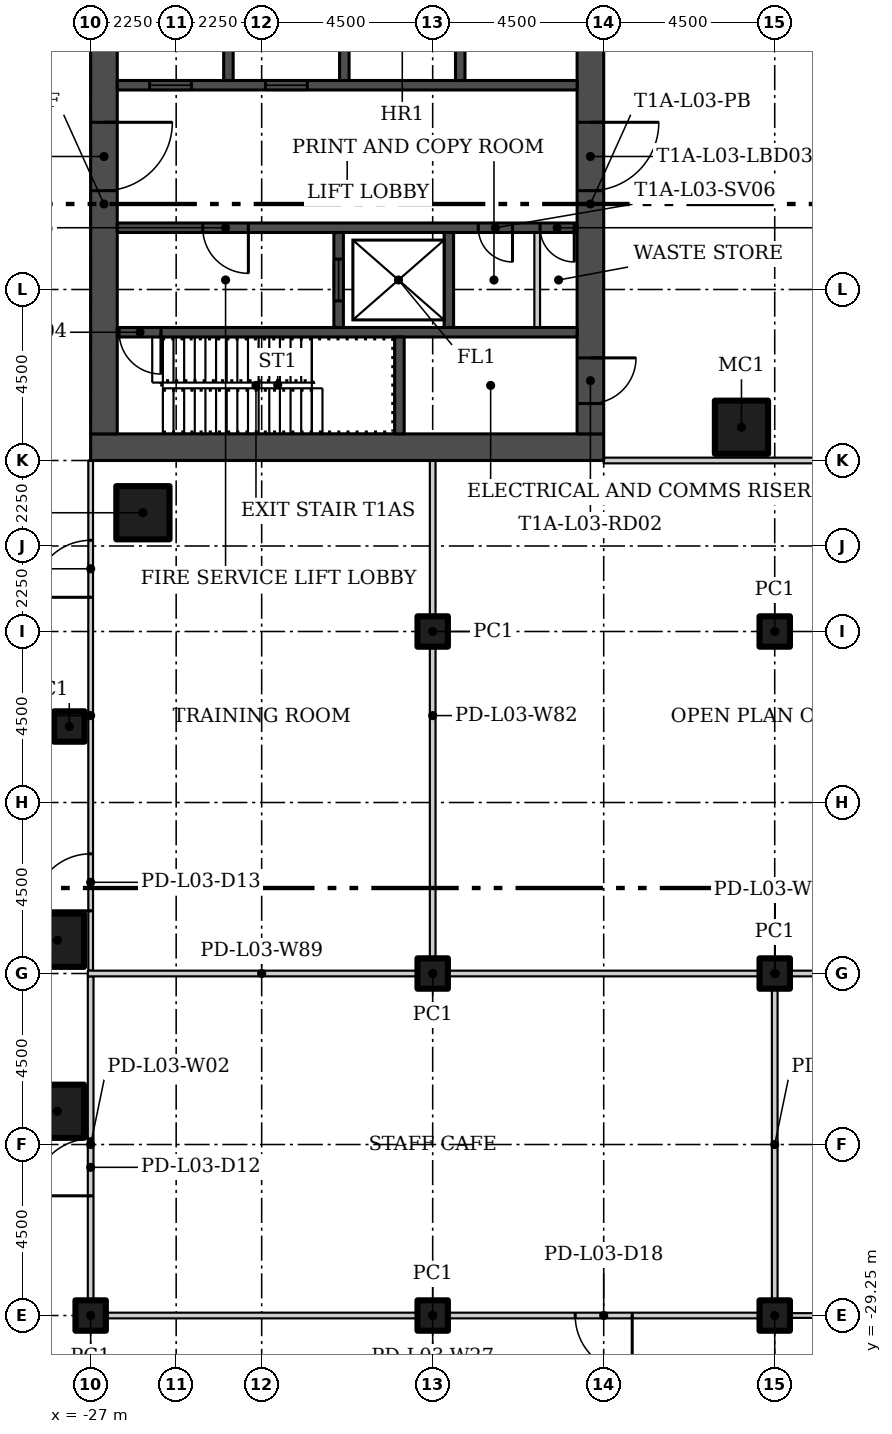
"""IFC4 building model, lengths in metres.
Left out: names, types, materials, properties, quantities, classifications, styles, units other than length and angle.
Written with IfcOpenShell. Run it as: python <this file> out.ifc"""

import sys

from ifc_helpers import new_model, si_unit, direction, frame, frame_2d, origin, origin_2d, place, context, subcontext, project, spatial, rectangle, hollow_rectangle, extrude, element, fill, save


model = new_model("IFC4")
c1 = context("Model", 3, precision=1e-05, world=origin(), true_north=direction((0.0, 1.0)))
c2 = subcontext(c1, "Body", "Model", "MODEL_VIEW")
j1 = project(units=[si_unit("LENGTHUNIT", "METRE"), si_unit("PLANEANGLEUNIT", "RADIAN")], contexts=[c1])
p1 = place(None, origin())
s1 = spatial("IfcSite", under=j1, at=p1, CompositionType="ELEMENT")
p2 = place(p1, origin())
s2 = spatial("IfcBuilding", under=s1, at=p2, CompositionType="ELEMENT")
p3 = place(p2, frame((0.0, 0.0, 18.5)))
s3 = spatial("IfcBuildingStorey", under=s2, at=p3, CompositionType="ELEMENT", Elevation=18.5)
for number, where in (
    (1, (-25.625, -8.125, 0.0)),
    (2, (-9.875, -5.875, 0.0)),
):
    element("IfcColumn", number, at=place(p3, frame(where)), inside=s3, PredefinedType="COLUMN", context=c2, shape_type="SweptSolid", body=[
        extrude(hollow_rectangle(XDim=1.4, YDim=1.4, WallThickness=0.06, at=origin_2d()), origin(), (0.0, 0.0, 1.0), 4.6),
    ])
p4 = place(p3, frame((-27.562, -13.75, 0.0)))
e3 = element("IfcColumn", 3, at=p4, inside=s3, PredefinedType="COLUMN", context=c2, shape_type="SweptSolid", body=[
    extrude(hollow_rectangle(XDim=0.8, YDim=0.8, WallThickness=0.03, at=origin_2d()), origin(), (0.0, 0.0, 1.0), 4.6),
])
for number, where in (
    (4, (-27.875, -19.375, 0.0)),
    (5, (-27.875, -23.875, 0.0)),
):
    element("IfcColumn", number, at=place(p3, frame(where)), inside=s3, PredefinedType="COLUMN", context=c2, shape_type="SweptSolid", body=[
        extrude(hollow_rectangle(XDim=1.4, YDim=1.4, WallThickness=0.06, at=origin_2d()), origin(), (0.0, 0.0, 1.0), 4.6),
    ])
for number, where in (
    (6, (-27.0, -29.25, 0.0)),
    (7, (-18.0, -29.25, 0.0)),
    (8, (-18.0, -20.25, 0.0)),
    (9, (-18.0, -11.25, 0.0)),
    (10, (-9.0, -29.25, 0.0)),
    (11, (-9.0, -20.25, 0.0)),
    (12, (-9.0, -11.25, 0.0)),
):
    element("IfcColumn", number, at=place(p3, frame(where)), inside=s3, PredefinedType="COLUMN", context=c2, shape_type="SweptSolid", body=[
        extrude(hollow_rectangle(XDim=0.8, YDim=0.8, WallThickness=0.03, at=origin_2d()), origin(), (0.0, 0.0, 1.0), 4.6),
    ])
p5 = place(p3, frame((-27.0, -29.175, 0.0), z_axis=(0.0, 0.0, 1.0), x_axis=(0.0, 1.0, 0.0)))
e13 = element("IfcWall", 13, at=p5, inside=s3, PredefinedType="PARTITIONING", context=c2, shape_type="SweptSolid", body=[
    extrude(rectangle(XDim=8.85, YDim=0.15, at=frame_2d((4.425, 0.0))), origin(), (0.0, 0.0, 1.0), 4.6),
])
p6 = place(p5, frame((3.075, 0.0, 0.0)))
e14 = element("IfcOpeningElement", 14, at=p6, cuts=e13, PredefinedType="OPENING", context=c2, shape_type="SweptSolid", body=[
    extrude(rectangle(XDim=1.5, YDim=2.1, at=frame_2d((0.75, 1.05))), frame((0.0, 0.085, 0.0), z_axis=(0.0, -1.0, 0.0), x_axis=(1.0, 0.0, 0.0)), (0.0, 0.0, 1.0), 0.17),
])
p7 = place(p3, frame((-27.0, -20.175, 0.0), z_axis=(0.0, 0.0, 1.0), x_axis=(0.0, 1.0, 0.0)))
e15 = element("IfcWall", 15, at=p7, inside=s3, PredefinedType="PARTITIONING", context=c2, shape_type="SweptSolid", body=[
    extrude(rectangle(XDim=13.425, YDim=0.125, at=frame_2d((6.712, 0.0))), origin(), (0.0, 0.0, 1.0), 4.6),
])
p8 = place(p7, frame((1.575, 0.0, 0.0)))
e16 = element("IfcOpeningElement", 16, at=p8, cuts=e15, PredefinedType="OPENING", context=c2, shape_type="SweptSolid", body=[
    extrude(rectangle(XDim=1.5, YDim=2.1, at=frame_2d((0.75, 1.05))), frame((0.0, 0.073, 0.0), z_axis=(0.0, -1.0, 0.0), x_axis=(1.0, 0.0, 0.0)), (0.0, 0.0, 1.0), 0.145),
])
p9 = place(p7, frame((9.825, 0.0, 0.0)))
e17 = element("IfcOpeningElement", 17, at=p9, cuts=e15, PredefinedType="OPENING", context=c2, shape_type="SweptSolid", body=[
    extrude(rectangle(XDim=1.5, YDim=2.1, at=frame_2d((0.75, 1.05))), frame((0.0, 0.073, 0.0), z_axis=(0.0, -1.0, 0.0), x_axis=(1.0, 0.0, 0.0)), (0.0, 0.0, 1.0), 0.145),
])
p10 = place(p3, frame((13.5, -6.75, 0.0), z_axis=(0.0, 0.0, 1.0), x_axis=(-1.0, 0.0, 0.0)))
e18 = element("IfcWall", 18, at=p10, inside=s3, PredefinedType="PARTITIONING", context=c2, shape_type="SweptSolid", body=[
    extrude(rectangle(XDim=27.0, YDim=0.15, at=frame_2d((13.5, 0.0))), origin(), (0.0, 0.0, 1.0), 4.6),
])
p11 = place(p10, frame((8.25, 0.0, 0.0)))
e19 = element("IfcOpeningElement", 19, at=p11, cuts=e18, PredefinedType="OPENING", context=c2, shape_type="SweptSolid", body=[
    extrude(rectangle(XDim=1.5, YDim=2.1, at=frame_2d((0.75, 1.05))), frame((0.0, 0.085, 0.0), z_axis=(0.0, -1.0, 0.0), x_axis=(1.0, 0.0, 0.0)), (0.0, 0.0, 1.0), 0.17),
])
p12 = place(p10, frame((16.65, 0.0, 0.0)))
e20 = element("IfcOpeningElement", 20, at=p12, cuts=e18, PredefinedType="OPENING", context=c2, shape_type="SweptSolid", body=[
    extrude(rectangle(XDim=1.5, YDim=2.1, at=frame_2d((0.75, 1.05))), frame((0.0, 0.085, 0.0), z_axis=(0.0, -1.0, 0.0), x_axis=(1.0, 0.0, 0.0)), (0.0, 0.0, 1.0), 0.17),
])
p13 = place(p3, frame((-8.925, -29.25, 0.0), z_axis=(0.0, 0.0, 1.0), x_axis=(-1.0, 0.0, 0.0)))
e21 = element("IfcWall", 21, at=p13, inside=s3, PredefinedType="PARTITIONING", context=c2, shape_type="SweptSolid", body=[
    extrude(rectangle(XDim=18.15, YDim=0.15, at=frame_2d((9.075, 0.0))), origin(), (0.0, 0.0, 1.0), 4.6),
])
p14 = place(p13, frame((3.825, 0.0, 0.0)))
e22 = element("IfcOpeningElement", 22, at=p14, cuts=e21, PredefinedType="OPENING", context=c2, shape_type="SweptSolid", body=[
    extrude(rectangle(XDim=1.5, YDim=2.1, at=frame_2d((0.75, 1.05))), frame((0.0, 0.085, 0.0), z_axis=(0.0, -1.0, 0.0), x_axis=(1.0, 0.0, 0.0)), (0.0, 0.0, 1.0), 0.17),
])
p15 = place(p3, frame((0.1, -29.25, 0.0), z_axis=(0.0, 0.0, 1.0), x_axis=(-1.0, 0.0, 0.0)))
e23 = element("IfcWall", 23, at=p15, inside=s3, PredefinedType="PARTITIONING", context=c2, shape_type="SweptSolid", body=[
    extrude(rectangle(XDim=9.175, YDim=0.125, at=frame_2d((4.587, 0.0))), origin(), (0.0, 0.0, 1.0), 4.6),
])
p16 = place(p15, frame((1.15, 0.0, 0.0)))
e24 = element("IfcOpeningElement", 24, at=p16, cuts=e23, PredefinedType="OPENING", context=c2, shape_type="SweptSolid", body=[
    extrude(rectangle(XDim=1.5, YDim=2.1, at=frame_2d((0.75, 1.05))), frame((0.0, 0.073, 0.0), z_axis=(0.0, -1.0, 0.0), x_axis=(1.0, 0.0, 0.0)), (0.0, 0.0, 1.0), 0.145),
])
p17 = place(p15, frame((6.55, 0.0, 0.0)))
e25 = element("IfcOpeningElement", 25, at=p17, cuts=e23, PredefinedType="OPENING", context=c2, shape_type="SweptSolid", body=[
    extrude(rectangle(XDim=1.5, YDim=2.1, at=frame_2d((0.75, 1.05))), frame((0.0, 0.073, 0.0), z_axis=(0.0, -1.0, 0.0), x_axis=(1.0, 0.0, 0.0)), (0.0, 0.0, 1.0), 0.145),
])
p18 = place(p3, frame((-18.075, -20.25, 0.0)))
e26 = element("IfcWall", 26, at=p18, inside=s3, PredefinedType="PARTITIONING", context=c2, shape_type="SweptSolid", body=[
    extrude(rectangle(XDim=18.175, YDim=0.15, at=frame_2d((9.087, 0.0))), origin(), (0.0, 0.0, 1.0), 4.6),
])
p19 = place(p3, frame((-18.0, -6.75, 0.0), z_axis=(0.0, 0.0, 1.0), x_axis=(0.0, -1.0, 0.0)))
e27 = element("IfcWall", 27, at=p19, inside=s3, PredefinedType="PARTITIONING", context=c2, shape_type="SweptSolid", body=[
    extrude(rectangle(XDim=13.425, YDim=0.15, at=frame_2d((6.712, 0.0))), origin(), (0.0, 0.0, 1.0), 4.6),
])
p20 = place(p3, frame((-17.925, -20.25, 0.0), z_axis=(0.0, 0.0, 1.0), x_axis=(-1.0, 0.0, 0.0)))
e28 = element("IfcWall", 28, at=p20, inside=s3, PredefinedType="PARTITIONING", context=c2, shape_type="SweptSolid", body=[
    extrude(rectangle(XDim=9.15, YDim=0.15, at=frame_2d((4.575, 0.0))), origin(), (0.0, 0.0, 1.0), 4.6),
])
p21 = place(p3, frame((-9.0, -29.175, 0.0), z_axis=(0.0, 0.0, 1.0), x_axis=(0.0, 1.0, 0.0)))
e29 = element("IfcWall", 29, at=p21, inside=s3, PredefinedType="PARTITIONING", context=c2, shape_type="SweptSolid", body=[
    extrude(rectangle(XDim=8.85, YDim=0.15, at=frame_2d((4.425, 0.0))), origin(), (0.0, 0.0, 1.0), 4.6),
])
p22 = place(p3, frame((-27.0, -6.4, 0.0)))
e30 = element("IfcWall", 30, at=p22, inside=s3, PredefinedType="SHEAR", context=c2, shape_type="SweptSolid", body=[
    extrude(rectangle(XDim=13.5, YDim=0.7, at=frame_2d((6.75, 0.0))), origin(), (0.0, 0.0, 1.0), 4.6),
])
p23 = place(p3, frame((-26.65, 6.05, 0.0), z_axis=(0.0, 0.0, 1.0), x_axis=(0.0, -1.0, 0.0)))
e31 = element("IfcWall", 31, at=p23, inside=s3, PredefinedType="SHEAR", context=c2, shape_type="SweptSolid", body=[
    extrude(rectangle(XDim=12.1, YDim=0.7, at=frame_2d((6.05, 0.0))), origin(), (0.0, 0.0, 1.0), 4.6),
])
p24 = place(p23, frame((3.9, 0.0, 0.0)))
e32 = element("IfcOpeningElement", 32, at=p24, cuts=e31, PredefinedType="OPENING", context=c2, shape_type="SweptSolid", body=[
    extrude(rectangle(XDim=1.8, YDim=2.4, at=frame_2d((0.9, 1.2))), frame((0.0, 0.36, 0.0), z_axis=(0.0, -1.0, 0.0), x_axis=(1.0, 0.0, 0.0)), (0.0, 0.0, 1.0), 0.72),
])
p25 = place(p3, frame((-13.85, 6.05, 0.0), z_axis=(0.0, 0.0, 1.0), x_axis=(0.0, -1.0, 0.0)))
e33 = element("IfcWall", 33, at=p25, inside=s3, PredefinedType="SHEAR", context=c2, shape_type="SweptSolid", body=[
    extrude(rectangle(XDim=12.1, YDim=0.7, at=frame_2d((6.05, 0.0))), origin(), (0.0, 0.0, 1.0), 4.6),
])
p26 = place(p25, frame((10.1, 0.0, 0.0)))
e34 = element("IfcOpeningElement", 34, at=p26, cuts=e33, PredefinedType="OPENING", context=c2, shape_type="SweptSolid", body=[
    extrude(rectangle(XDim=1.2, YDim=2.1, at=frame_2d((0.6, 1.05))), frame((0.0, 0.36, 0.0), z_axis=(0.0, -1.0, 0.0), x_axis=(1.0, 0.0, 0.0)), (0.0, 0.0, 1.0), 0.72),
])
p27 = place(p25, frame((3.9, 0.0, 0.0)))
e35 = element("IfcOpeningElement", 35, at=p27, cuts=e33, PredefinedType="OPENING", context=c2, shape_type="SweptSolid", body=[
    extrude(rectangle(XDim=1.8, YDim=2.4, at=frame_2d((0.9, 1.2))), frame((0.0, 0.36, 0.0), z_axis=(0.0, -1.0, 0.0), x_axis=(1.0, 0.0, 0.0)), (0.0, 0.0, 1.0), 0.72),
])
p28 = place(p3, frame((-14.2, -3.375, 0.0), z_axis=(0.0, 0.0, 1.0), x_axis=(-1.0, 0.0, 0.0)))
e36 = element("IfcWall", 36, at=p28, inside=s3, PredefinedType="SHEAR", context=c2, shape_type="SweptSolid", body=[
    extrude(rectangle(XDim=12.1, YDim=0.25, at=frame_2d((6.05, 0.0))), origin(), (0.0, 0.0, 1.0), 4.6),
])
p29 = place(p28, frame((10.95, 0.0, 0.0)))
e37 = element("IfcOpeningElement", 37, at=p29, cuts=e36, PredefinedType="OPENING", context=c2, shape_type="SweptSolid", body=[
    extrude(rectangle(XDim=1.1, YDim=2.1, at=frame_2d((0.55, 1.05))), frame((0.0, 0.135, 0.0), z_axis=(0.0, -1.0, 0.0), x_axis=(1.0, 0.0, 0.0)), (0.0, 0.0, 1.0), 0.27),
])
p30 = place(p3, frame((-18.875, -6.05, 0.0), z_axis=(0.0, 0.0, 1.0), x_axis=(0.0, 1.0, 0.0)))
e38 = element("IfcWall", 38, at=p30, inside=s3, PredefinedType="SHEAR", context=c2, shape_type="SweptSolid", body=[
    extrude(rectangle(XDim=2.55, YDim=0.25, at=frame_2d((1.275, 0.0))), origin(), (0.0, 0.0, 1.0), 4.6),
])
p31 = place(p3, frame((-14.2, -0.625, 0.0), z_axis=(0.0, 0.0, 1.0), x_axis=(-1.0, 0.0, 0.0)))
e39 = element("IfcWall", 39, at=p31, inside=s3, PredefinedType="SHEAR", context=c2, shape_type="SweptSolid", body=[
    extrude(rectangle(XDim=12.1, YDim=0.25, at=frame_2d((6.05, 0.0))), origin(), (0.0, 0.0, 1.0), 4.6),
])
p32 = place(p31, frame((8.65, 0.0, 0.0)))
e40 = element("IfcOpeningElement", 40, at=p32, cuts=e39, PredefinedType="OPENING", context=c2, shape_type="SweptSolid", body=[
    extrude(rectangle(XDim=1.2, YDim=2.1, at=frame_2d((0.6, 1.05))), frame((0.0, 0.135, 0.0), z_axis=(0.0, -1.0, 0.0), x_axis=(1.0, 0.0, 0.0)), (0.0, 0.0, 1.0), 0.27),
])
p33 = place(p31, frame((1.7, 0.0, 0.0)))
e41 = element("IfcOpeningElement", 41, at=p33, cuts=e39, PredefinedType="OPENING", context=c2, shape_type="SweptSolid", body=[
    extrude(rectangle(XDim=0.9, YDim=2.1, at=frame_2d((0.45, 1.05))), frame((0.0, 0.135, 0.0), z_axis=(0.0, -1.0, 0.0), x_axis=(1.0, 0.0, 0.0)), (0.0, 0.0, 1.0), 0.27),
])
p34 = place(p31, frame((0.075, 0.0, 0.0)))
e42 = element("IfcOpeningElement", 42, at=p34, cuts=e39, PredefinedType="OPENING", context=c2, shape_type="SweptSolid", body=[
    extrude(rectangle(XDim=0.9, YDim=2.1, at=frame_2d((0.45, 1.05))), frame((0.0, 0.135, 0.0), z_axis=(0.0, -1.0, 0.0), x_axis=(1.0, 0.0, 0.0)), (0.0, 0.0, 1.0), 0.27),
])
p35 = place(p3, frame((-20.475, -3.25, 0.0), z_axis=(0.0, 0.0, 1.0), x_axis=(0.0, 1.0, 0.0)))
e43 = element("IfcWall", 43, at=p35, inside=s3, PredefinedType="SHEAR", context=c2, shape_type="SweptSolid", body=[
    extrude(rectangle(XDim=2.5, YDim=0.25, at=frame_2d((1.25, 0.0))), origin(), (0.0, 0.0, 1.0), 4.6),
])
p36 = place(p35, frame((0.7, 0.0, 0.0)))
e44 = element("IfcOpeningElement", 44, at=p36, cuts=e43, PredefinedType="OPENING", context=c2, shape_type="SweptSolid", body=[
    extrude(rectangle(XDim=1.1, YDim=2.1, at=frame_2d((0.55, 1.05))), frame((0.0, 0.135, 0.0), z_axis=(0.0, -1.0, 0.0), x_axis=(1.0, 0.0, 0.0)), (0.0, 0.0, 1.0), 0.27),
])
p37 = place(p3, frame((-17.575, -3.25, 0.0), z_axis=(0.0, 0.0, 1.0), x_axis=(0.0, 1.0, 0.0)))
e45 = element("IfcWall", 45, at=p37, inside=s3, PredefinedType="SHEAR", context=c2, shape_type="SweptSolid", body=[
    extrude(rectangle(XDim=2.5, YDim=0.25, at=frame_2d((1.25, 0.0))), origin(), (0.0, 0.0, 1.0), 4.6),
])
p38 = place(p3, frame((-15.25, -3.25, 0.0), z_axis=(0.0, 0.0, 1.0), x_axis=(0.0, 1.0, 0.0)))
e46 = element("IfcWall", 46, at=p38, inside=s3, PredefinedType="PARTITIONING", context=c2, shape_type="SweptSolid", body=[
    extrude(rectangle(XDim=2.5, YDim=0.15, at=frame_2d((1.25, 0.0))), origin(), (0.0, 0.0, 1.0), 4.6),
])
p39 = place(p3, frame((-26.3, 3.125, 0.0)))
e47 = element("IfcWall", 47, at=p39, inside=s3, PredefinedType="SHEAR", context=c2, shape_type="SweptSolid", body=[
    extrude(rectangle(XDim=12.1, YDim=0.25, at=frame_2d((6.05, 0.0))), origin(), (0.0, 0.0, 1.0), 4.6),
])
p40 = place(p39, frame((0.85, 0.0, 0.0)))
e48 = element("IfcOpeningElement", 48, at=p40, cuts=e47, PredefinedType="OPENING", context=c2, shape_type="SweptSolid", body=[
    extrude(rectangle(XDim=1.1, YDim=2.1, at=frame_2d((0.55, 1.05))), frame((0.0, 0.135, 0.0), z_axis=(0.0, -1.0, 0.0), x_axis=(1.0, 0.0, 0.0)), (0.0, 0.0, 1.0), 0.27),
])
p41 = place(p39, frame((3.9, 0.0, 0.0)))
e49 = element("IfcOpeningElement", 49, at=p41, cuts=e47, PredefinedType="OPENING", context=c2, shape_type="SweptSolid", body=[
    extrude(rectangle(XDim=1.1, YDim=2.1, at=frame_2d((0.55, 1.05))), frame((0.0, 0.135, 0.0), z_axis=(0.0, -1.0, 0.0), x_axis=(1.0, 0.0, 0.0)), (0.0, 0.0, 1.0), 0.27),
])
for number, where, z_axis, x_axis in (
    (50, (-23.375, 3.25, 0.0), (0.0, 0.0, 1.0), (0.0, 1.0, 0.0)),
    (51, (-20.325, 3.25, 0.0), (0.0, 0.0, 1.0), (0.0, 1.0, 0.0)),
    (52, (-17.275, 3.25, 0.0), (0.0, 0.0, 1.0), (0.0, 1.0, 0.0)),
):
    element("IfcWall", number, at=place(p3, frame(where, z_axis=z_axis, x_axis=x_axis)), inside=s3, PredefinedType="SHEAR", context=c2, shape_type="SweptSolid", body=[
        extrude(rectangle(XDim=2.8, YDim=0.25, at=frame_2d((1.4, 0.0))), origin(), (0.0, 0.0, 1.0), 4.6),
    ])
p42 = place(p6, origin())
e53 = element("IfcDoor", 53, at=p42, inside=s3, OperationType="DOUBLE_DOOR_SINGLE_SWING", PredefinedType="DOOR", context=c2, shape_type="SweptSolid", body=[
    extrude(rectangle(XDim=1.5, YDim=2.1, at=frame_2d((0.75, 1.05))), frame((0.0, 0.025, 0.0), z_axis=(0.0, -1.0, 0.0), x_axis=(1.0, 0.0, 0.0)), (0.0, 0.0, 1.0), 0.05),
])
fill(e14, e53)
p43 = place(p8, origin())
e54 = element("IfcDoor", 54, at=p43, inside=s3, OperationType="DOUBLE_DOOR_SINGLE_SWING", PredefinedType="DOOR", context=c2, shape_type="SweptSolid", body=[
    extrude(rectangle(XDim=1.5, YDim=2.1, at=frame_2d((0.75, 1.05))), frame((0.0, 0.025, 0.0), z_axis=(0.0, -1.0, 0.0), x_axis=(1.0, 0.0, 0.0)), (0.0, 0.0, 1.0), 0.05),
])
fill(e16, e54)
p44 = place(p9, origin())
e55 = element("IfcDoor", 55, at=p44, inside=s3, OperationType="DOUBLE_DOOR_SINGLE_SWING", PredefinedType="DOOR", context=c2, shape_type="SweptSolid", body=[
    extrude(rectangle(XDim=1.5, YDim=2.1, at=frame_2d((0.75, 1.05))), frame((0.0, 0.025, 0.0), z_axis=(0.0, -1.0, 0.0), x_axis=(1.0, 0.0, 0.0)), (0.0, 0.0, 1.0), 0.05),
])
fill(e17, e55)
p45 = place(p14, origin())
e56 = element("IfcDoor", 56, at=p45, inside=s3, OperationType="DOUBLE_DOOR_SINGLE_SWING", PredefinedType="DOOR", context=c2, shape_type="SweptSolid", body=[
    extrude(rectangle(XDim=1.5, YDim=2.1, at=frame_2d((0.75, 1.05))), frame((0.0, 0.025, 0.0), z_axis=(0.0, -1.0, 0.0), x_axis=(1.0, 0.0, 0.0)), (0.0, 0.0, 1.0), 0.05),
])
fill(e22, e56)
p46 = place(p24, origin())
e57 = element("IfcDoor", 57, at=p46, inside=s3, OperationType="DOUBLE_DOOR_SINGLE_SWING", PredefinedType="DOOR", context=c2, shape_type="SweptSolid", body=[
    extrude(rectangle(XDim=1.8, YDim=2.4, at=frame_2d((0.9, 1.2))), frame((0.0, 0.025, 0.0), z_axis=(0.0, -1.0, 0.0), x_axis=(1.0, 0.0, 0.0)), (0.0, 0.0, 1.0), 0.05),
])
fill(e32, e57)
p47 = place(p26, origin())
e58 = element("IfcDoor", 58, at=p47, inside=s3, OperationType="SINGLE_SWING_RIGHT", PredefinedType="DOOR", context=c2, shape_type="SweptSolid", body=[
    extrude(rectangle(XDim=1.2, YDim=2.1, at=frame_2d((0.6, 1.05))), frame((0.0, 0.025, 0.0), z_axis=(0.0, -1.0, 0.0), x_axis=(1.0, 0.0, 0.0)), (0.0, 0.0, 1.0), 0.05),
])
fill(e34, e58)
p48 = place(p27, origin())
e59 = element("IfcDoor", 59, at=p48, inside=s3, OperationType="DOUBLE_DOOR_SINGLE_SWING", PredefinedType="DOOR", context=c2, shape_type="SweptSolid", body=[
    extrude(rectangle(XDim=1.8, YDim=2.4, at=frame_2d((0.9, 1.2))), frame((0.0, 0.025, 0.0), z_axis=(0.0, -1.0, 0.0), x_axis=(1.0, 0.0, 0.0)), (0.0, 0.0, 1.0), 0.05),
])
fill(e35, e59)
p49 = place(p29, origin())
e60 = element("IfcDoor", 60, at=p49, inside=s3, OperationType="SINGLE_SWING_RIGHT", PredefinedType="DOOR", context=c2, shape_type="SweptSolid", body=[
    extrude(rectangle(XDim=1.1, YDim=2.1, at=frame_2d((0.55, 1.05))), frame((0.0, 0.025, 0.0), z_axis=(0.0, -1.0, 0.0), x_axis=(1.0, 0.0, 0.0)), (0.0, 0.0, 1.0), 0.05),
])
fill(e37, e60)
p50 = place(p32, origin())
e61 = element("IfcDoor", 61, at=p50, inside=s3, OperationType="SINGLE_SWING_RIGHT", PredefinedType="DOOR", context=c2, shape_type="SweptSolid", body=[
    extrude(rectangle(XDim=1.2, YDim=2.1, at=frame_2d((0.6, 1.05))), frame((0.0, 0.025, 0.0), z_axis=(0.0, -1.0, 0.0), x_axis=(1.0, 0.0, 0.0)), (0.0, 0.0, 1.0), 0.05),
])
fill(e40, e61)
p51 = place(p33, origin())
e62 = element("IfcDoor", 62, at=p51, inside=s3, OperationType="SINGLE_SWING_LEFT", PredefinedType="DOOR", context=c2, shape_type="SweptSolid", body=[
    extrude(rectangle(XDim=0.9, YDim=2.1, at=frame_2d((0.45, 1.05))), frame((0.0, 0.025, 0.0), z_axis=(0.0, -1.0, 0.0), x_axis=(1.0, 0.0, 0.0)), (0.0, 0.0, 1.0), 0.05),
])
fill(e41, e62)
p52 = place(p34, origin())
e63 = element("IfcDoor", 63, at=p52, inside=s3, OperationType="SINGLE_SWING_LEFT", PredefinedType="DOOR", context=c2, shape_type="SweptSolid", body=[
    extrude(rectangle(XDim=0.9, YDim=2.1, at=frame_2d((0.45, 1.05))), frame((0.0, 0.025, 0.0), z_axis=(0.0, -1.0, 0.0), x_axis=(1.0, 0.0, 0.0)), (0.0, 0.0, 1.0), 0.05),
])
fill(e42, e63)
p53 = place(p36, origin())
e64 = element("IfcDoor", 64, at=p53, inside=s3, OperationType="SLIDING_TO_LEFT", PredefinedType="DOOR", context=c2, shape_type="SweptSolid", body=[
    extrude(rectangle(XDim=1.1, YDim=2.1, at=frame_2d((0.55, 1.05))), frame((0.0, 0.025, 0.0), z_axis=(0.0, -1.0, 0.0), x_axis=(1.0, 0.0, 0.0)), (0.0, 0.0, 1.0), 0.05),
])
fill(e44, e64)
p54 = place(p40, origin())
e65 = element("IfcDoor", 65, at=p54, inside=s3, OperationType="SLIDING_TO_LEFT", PredefinedType="DOOR", context=c2, shape_type="SweptSolid", body=[
    extrude(rectangle(XDim=1.1, YDim=2.1, at=frame_2d((0.55, 1.05))), frame((0.0, 0.025, 0.0), z_axis=(0.0, -1.0, 0.0), x_axis=(1.0, 0.0, 0.0)), (0.0, 0.0, 1.0), 0.05),
])
fill(e48, e65)
p55 = place(p41, origin())
e66 = element("IfcDoor", 66, at=p55, inside=s3, OperationType="SLIDING_TO_LEFT", PredefinedType="DOOR", context=c2, shape_type="SweptSolid", body=[
    extrude(rectangle(XDim=1.1, YDim=2.1, at=frame_2d((0.55, 1.05))), frame((0.0, 0.025, 0.0), z_axis=(0.0, -1.0, 0.0), x_axis=(1.0, 0.0, 0.0)), (0.0, 0.0, 1.0), 0.05),
])
fill(e49, e66)
save(model, sys.argv[1])
